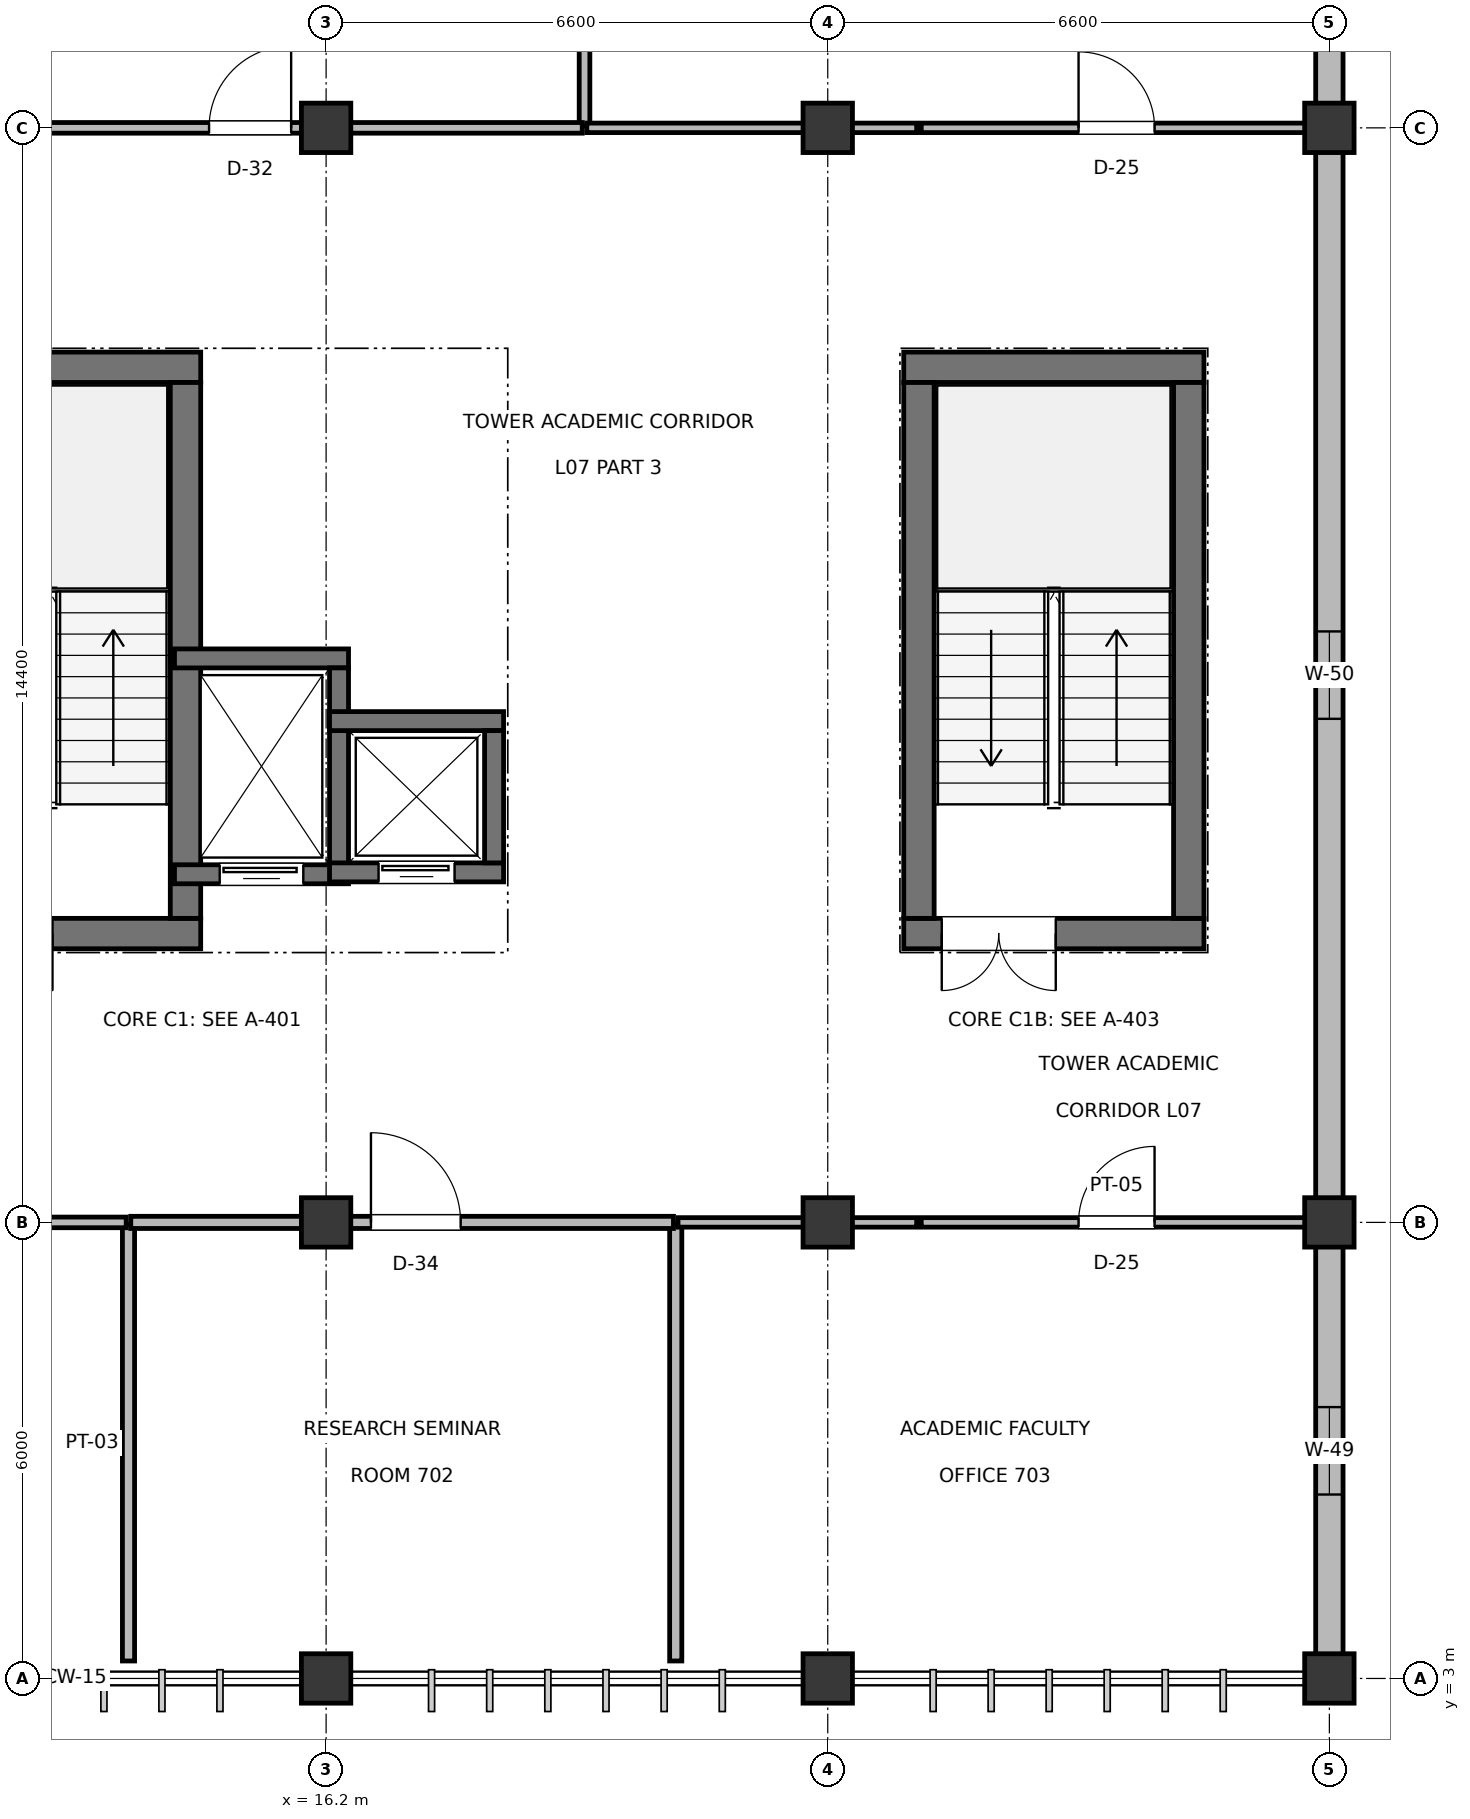
"""IFC4 building model, lengths in metres.
Left out: names, types, materials, properties, quantities, classifications, styles, units other than length and angle.
Written with IfcOpenShell. Run it as: python <this file> out.ifc"""

import sys

from ifc_helpers import new_model, si_unit, direction, frame, frame_2d, origin, origin_2d, place, context, subcontext, project, spatial, rectangle, extrude, element, fill, save


model = new_model("IFC4")
c1 = context("Model", 3, precision=1e-05, world=origin(), true_north=direction((0.0, 1.0)))
c2 = subcontext(c1, "Body", "Model", "MODEL_VIEW")
j1 = project(units=[si_unit("LENGTHUNIT", "METRE"), si_unit("PLANEANGLEUNIT", "RADIAN")], contexts=[c1])
p1 = place(None, origin())
s1 = spatial("IfcSite", under=j1, at=p1, CompositionType="ELEMENT")
p2 = place(p1, origin())
s2 = spatial("IfcBuilding", under=s1, at=p2, CompositionType="ELEMENT")
p3 = place(p2, frame((0.0, 0.0, 33.0)))
s3 = spatial("IfcBuildingStorey", under=s2, at=p3, CompositionType="ELEMENT", Elevation=33.0)
for number, where, z_axis, x_axis in (
    (1, (16.2, 3.0, 0.0), (0.0, 0.0, 1.0), (1.0, 0.0, 0.0)),
    (2, (16.2, 9.0, 0.0), (0.0, 0.0, 1.0), (1.0, 0.0, 0.0)),
    (3, (16.2, 23.4, 0.0), (0.0, 0.0, 1.0), (1.0, 0.0, 0.0)),
    (4, (22.8, 3.0, 0.0), (0.0, 0.0, 1.0), (1.0, 0.0, 0.0)),
    (5, (22.8, 9.0, 0.0), (0.0, 0.0, 1.0), (1.0, 0.0, 0.0)),
    (6, (22.8, 23.4, 0.0), (0.0, 0.0, 1.0), (1.0, 0.0, 0.0)),
    (7, (29.4, 3.0, 0.0), (0.0, 0.0, 1.0), (1.0, 0.0, 0.0)),
    (8, (29.4, 9.0, 0.0), (0.0, 0.0, 1.0), (1.0, 0.0, 0.0)),
    (9, (29.4, 23.4, 0.0), (0.0, 0.0, 1.0), (1.0, 0.0, 0.0)),
):
    element("IfcColumn", number, at=place(p3, frame(where, z_axis=z_axis, x_axis=x_axis)), inside=s3, PredefinedType="COLUMN", context=c2, shape_type="SweptSolid", body=[
        extrude(rectangle(XDim=0.65, YDim=0.65, at=origin_2d()), origin(), (0.0, 0.0, 1.0), 3.8),
    ])
p4 = place(p3, frame((29.4, 3.305, 0.0), z_axis=(0.0, 0.0, 1.0), x_axis=(0.0, 1.0, 0.0)))
e10 = element("IfcWall", 10, at=p4, inside=s3, PredefinedType="SOLIDWALL", context=c2, shape_type="SweptSolid", body=[
    extrude(rectangle(XDim=5.38, YDim=0.36, at=frame_2d((2.69, 0.0))), origin(), (0.0, 0.0, 1.0), 2.925),
])
p5 = place(p4, frame((2.115, 0.0, 0.9)))
e11 = element("IfcOpeningElement", 11, at=p5, cuts=e10, PredefinedType="OPENING", context=c2, shape_type="SweptSolid", body=[
    extrude(rectangle(XDim=1.15, YDim=1.15, at=frame_2d((0.575, 0.575))), frame((0.0, 0.19, 0.0), z_axis=(0.0, -1.0, 0.0), x_axis=(1.0, 0.0, 0.0)), (0.0, 0.0, 1.0), 0.38),
])
p6 = place(p3, frame((29.4, 9.315, 0.0), z_axis=(0.0, 0.0, 1.0), x_axis=(0.0, 1.0, 0.0)))
e12 = element("IfcWall", 12, at=p6, inside=s3, PredefinedType="SOLIDWALL", context=c2, shape_type="SweptSolid", body=[
    extrude(rectangle(XDim=13.77, YDim=0.36, at=frame_2d((6.885, 0.0))), origin(), (0.0, 0.0, 1.0), 2.725),
])
p7 = place(p6, frame((6.31, 0.0, 0.9)))
e13 = element("IfcOpeningElement", 13, at=p7, cuts=e12, PredefinedType="OPENING", context=c2, shape_type="SweptSolid", body=[
    extrude(rectangle(XDim=1.15, YDim=1.35, at=frame_2d((0.575, 0.675))), frame((0.0, 0.19, 0.0), z_axis=(0.0, -1.0, 0.0), x_axis=(1.0, 0.0, 0.0)), (0.0, 0.0, 1.0), 0.38),
])
p8 = place(p3, frame((29.4, 23.705, 0.0), z_axis=(0.0, 0.0, 1.0), x_axis=(0.0, 1.0, 0.0)))
e14 = element("IfcWall", 14, at=p8, inside=s3, PredefinedType="SOLIDWALL", context=c2, shape_type="SweptSolid", body=[
    extrude(rectangle(XDim=5.99, YDim=0.36, at=frame_2d((2.995, 0.0))), origin(), (0.0, 0.0, 1.0), 2.875),
])
p9 = place(p8, frame((2.42, 0.0, 0.9)))
e15 = element("IfcOpeningElement", 15, at=p9, cuts=e14, PredefinedType="OPENING", context=c2, shape_type="SweptSolid", body=[
    extrude(rectangle(XDim=1.15, YDim=1.55, at=frame_2d((0.575, 0.775))), frame((0.0, 0.19, 0.0), z_axis=(0.0, -1.0, 0.0), x_axis=(1.0, 0.0, 0.0)), (0.0, 0.0, 1.0), 0.38),
])
p10 = place(p3, frame((10.6, 12.8, 0.0), z_axis=(0.0, 0.0, 1.0), x_axis=(1.0, 0.0, 0.0)))
e16 = element("IfcWall", 16, at=p10, inside=s3, PredefinedType="SHEAR", context=c2, shape_type="SweptSolid", body=[
    extrude(rectangle(XDim=3.95, YDim=0.4, at=frame_2d((1.975, 0.0))), origin(), (0.0, 0.0, 1.0), 3.58),
])
p11 = place(p10, frame((0.5, 0.0, 0.0)))
e17 = element("IfcOpeningElement", 17, at=p11, cuts=e16, PredefinedType="OPENING", context=c2, shape_type="SweptSolid", body=[
    extrude(rectangle(XDim=1.5, YDim=2.2, at=frame_2d((0.75, 1.1))), frame((0.0, 0.21, 0.0), z_axis=(0.0, -1.0, 0.0), x_axis=(1.0, 0.0, 0.0)), (0.0, 0.0, 1.0), 0.42),
])
p12 = place(p3, frame((10.6, 20.25, 0.0), z_axis=(0.0, 0.0, 1.0), x_axis=(1.0, 0.0, 0.0)))
e18 = element("IfcWall", 18, at=p12, inside=s3, PredefinedType="SHEAR", context=c2, shape_type="SweptSolid", body=[
    extrude(rectangle(XDim=3.95, YDim=0.4, at=frame_2d((1.975, 0.0))), origin(), (0.0, 0.0, 1.0), 3.58),
])
p13 = place(p3, frame((14.35, 13.0, 0.0), z_axis=(0.0, 0.0, 1.0), x_axis=(0.0, 1.0, 0.0)))
e19 = element("IfcWall", 19, at=p13, inside=s3, PredefinedType="SHEAR", context=c2, shape_type="SweptSolid", body=[
    extrude(rectangle(XDim=7.05, YDim=0.4, at=frame_2d((3.525, 0.0))), origin(), (0.0, 0.0, 1.0), 3.58),
])
p14 = place(p3, frame((14.205, 13.58, 0.0), z_axis=(0.0, 0.0, 1.0), x_axis=(1.0, 0.0, 0.0)))
e20 = element("IfcWall", 20, at=p14, inside=s3, PredefinedType="SHEAR", context=c2, shape_type="SweptSolid", body=[
    extrude(rectangle(XDim=2.29, YDim=0.25, at=frame_2d((1.145, 0.0))), origin(), (0.0, 0.0, 1.0), 3.56),
])
p15 = place(p14, frame((0.595, 0.0, 0.0)))
e21 = element("IfcOpeningElement", 21, at=p15, cuts=e20, PredefinedType="OPENING", context=c2, shape_type="SweptSolid", body=[
    extrude(rectangle(XDim=1.1, YDim=2.2, at=frame_2d((0.55, 1.1))), frame((0.0, 0.135, 0.0), z_axis=(0.0, -1.0, 0.0), x_axis=(1.0, 0.0, 0.0)), (0.0, 0.0, 1.0), 0.27),
])
p16 = place(p3, frame((14.205, 16.42, 0.0), z_axis=(0.0, 0.0, 1.0), x_axis=(1.0, 0.0, 0.0)))
e22 = element("IfcWall", 22, at=p16, inside=s3, PredefinedType="SHEAR", context=c2, shape_type="SweptSolid", body=[
    extrude(rectangle(XDim=2.29, YDim=0.25, at=frame_2d((1.145, 0.0))), origin(), (0.0, 0.0, 1.0), 3.56),
])
p17 = place(p3, frame((16.37, 13.705, 0.0), z_axis=(0.0, 0.0, 1.0), x_axis=(0.0, 1.0, 0.0)))
e23 = element("IfcWall", 23, at=p17, inside=s3, PredefinedType="SHEAR", context=c2, shape_type="SweptSolid", body=[
    extrude(rectangle(XDim=2.59, YDim=0.25, at=frame_2d((1.295, 0.0))), origin(), (0.0, 0.0, 1.0), 3.56),
])
p18 = place(p3, frame((16.245, 13.605, 0.0), z_axis=(0.0, 0.0, 1.0), x_axis=(1.0, 0.0, 0.0)))
e24 = element("IfcWall", 24, at=p18, inside=s3, PredefinedType="SHEAR", context=c2, shape_type="SweptSolid", body=[
    extrude(rectangle(XDim=2.29, YDim=0.25, at=frame_2d((1.145, 0.0))), origin(), (0.0, 0.0, 1.0), 3.56),
])
p19 = place(p18, frame((0.645, 0.0, 0.0)))
e25 = element("IfcOpeningElement", 25, at=p19, cuts=e24, PredefinedType="OPENING", context=c2, shape_type="SweptSolid", body=[
    extrude(rectangle(XDim=1.0, YDim=2.15, at=frame_2d((0.5, 1.075))), frame((0.0, 0.135, 0.0), z_axis=(0.0, -1.0, 0.0), x_axis=(1.0, 0.0, 0.0)), (0.0, 0.0, 1.0), 0.27),
])
p20 = place(p3, frame((16.245, 15.595, 0.0), z_axis=(0.0, 0.0, 1.0), x_axis=(1.0, 0.0, 0.0)))
e26 = element("IfcWall", 26, at=p20, inside=s3, PredefinedType="SHEAR", context=c2, shape_type="SweptSolid", body=[
    extrude(rectangle(XDim=2.29, YDim=0.25, at=frame_2d((1.145, 0.0))), origin(), (0.0, 0.0, 1.0), 3.56),
])
p21 = place(p3, frame((18.41, 13.73, 0.0), z_axis=(0.0, 0.0, 1.0), x_axis=(0.0, 1.0, 0.0)))
e27 = element("IfcWall", 27, at=p21, inside=s3, PredefinedType="SHEAR", context=c2, shape_type="SweptSolid", body=[
    extrude(rectangle(XDim=1.74, YDim=0.25, at=frame_2d((0.87, 0.0))), origin(), (0.0, 0.0, 1.0), 3.56),
])
p22 = place(p3, frame((23.8, 12.8, 0.0), z_axis=(0.0, 0.0, 1.0), x_axis=(1.0, 0.0, 0.0)))
e28 = element("IfcWall", 28, at=p22, inside=s3, PredefinedType="SHEAR", context=c2, shape_type="SweptSolid", body=[
    extrude(rectangle(XDim=3.95, YDim=0.4, at=frame_2d((1.975, 0.0))), origin(), (0.0, 0.0, 1.0), 3.58),
])
p23 = place(p22, frame((0.5, 0.0, 0.0)))
e29 = element("IfcOpeningElement", 29, at=p23, cuts=e28, PredefinedType="OPENING", context=c2, shape_type="SweptSolid", body=[
    extrude(rectangle(XDim=1.5, YDim=2.2, at=frame_2d((0.75, 1.1))), frame((0.0, 0.21, 0.0), z_axis=(0.0, -1.0, 0.0), x_axis=(1.0, 0.0, 0.0)), (0.0, 0.0, 1.0), 0.42),
])
p24 = place(p3, frame((23.8, 20.25, 0.0), z_axis=(0.0, 0.0, 1.0), x_axis=(1.0, 0.0, 0.0)))
e30 = element("IfcWall", 30, at=p24, inside=s3, PredefinedType="SHEAR", context=c2, shape_type="SweptSolid", body=[
    extrude(rectangle(XDim=3.95, YDim=0.4, at=frame_2d((1.975, 0.0))), origin(), (0.0, 0.0, 1.0), 3.58),
])
for number, where, z_axis, x_axis in (
    (31, (24.0, 13.0, 0.0), (0.0, 0.0, 1.0), (0.0, 1.0, 0.0)),
    (32, (27.55, 13.0, 0.0), (0.0, 0.0, 1.0), (0.0, 1.0, 0.0)),
):
    element("IfcWall", number, at=place(p3, frame(where, z_axis=z_axis, x_axis=x_axis)), inside=s3, PredefinedType="SHEAR", context=c2, shape_type="SweptSolid", body=[
        extrude(rectangle(XDim=7.05, YDim=0.4, at=frame_2d((3.525, 0.0))), origin(), (0.0, 0.0, 1.0), 3.58),
    ])
p25 = place(p3, frame((13.6, 3.23, 0.0), z_axis=(0.0, 0.0, 1.0), x_axis=(0.0, 1.0, 0.0)))
e33 = element("IfcWall", 33, at=p25, inside=s3, PredefinedType="PARTITIONING", context=c2, shape_type="SweptSolid", body=[
    extrude(rectangle(XDim=5.74, YDim=0.16, at=frame_2d((2.87, 0.0))), origin(), (0.0, 0.0, 1.0), 2.825),
])
p26 = place(p3, frame((10.83, 9.0, 0.0), z_axis=(0.0, 0.0, 1.0), x_axis=(1.0, 0.0, 0.0)))
e34 = element("IfcWall", 34, at=p26, inside=s3, PredefinedType="PARTITIONING", context=c2, shape_type="SweptSolid", body=[
    extrude(rectangle(XDim=2.74, YDim=0.14, at=frame_2d((1.37, 0.0))), origin(), (0.0, 0.0, 1.0), 2.825),
])
p27 = place(p3, frame((20.8, 3.23, 0.0), z_axis=(0.0, 0.0, 1.0), x_axis=(0.0, 1.0, 0.0)))
e35 = element("IfcWall", 35, at=p27, inside=s3, PredefinedType="PARTITIONING", context=c2, shape_type="SweptSolid", body=[
    extrude(rectangle(XDim=5.74, YDim=0.16, at=frame_2d((2.87, 0.0))), origin(), (0.0, 0.0, 1.0), 2.755),
])
p28 = place(p3, frame((13.63, 9.0, 0.0), z_axis=(0.0, 0.0, 1.0), x_axis=(1.0, 0.0, 0.0)))
e36 = element("IfcWall", 36, at=p28, inside=s3, PredefinedType="PARTITIONING", context=c2, shape_type="SweptSolid", body=[
    extrude(rectangle(XDim=7.14, YDim=0.16, at=frame_2d((3.57, 0.0))), origin(), (0.0, 0.0, 1.0), 2.755),
])
p29 = place(p28, frame((3.16, 0.0, 0.0)))
e37 = element("IfcOpeningElement", 37, at=p29, cuts=e36, PredefinedType="OPENING", context=c2, shape_type="SweptSolid", body=[
    extrude(rectangle(XDim=1.18, YDim=2.2, at=frame_2d((0.59, 1.1))), frame((0.0, 0.09, 0.0), z_axis=(0.0, -1.0, 0.0), x_axis=(1.0, 0.0, 0.0)), (0.0, 0.0, 1.0), 0.18),
])
p30 = place(p3, frame((24.03, 9.0, 0.0), z_axis=(0.0, 0.0, 1.0), x_axis=(1.0, 0.0, 0.0)))
e38 = element("IfcWall", 38, at=p30, inside=s3, PredefinedType="PARTITIONING", context=c2, shape_type="SweptSolid", body=[
    extrude(rectangle(XDim=5.14, YDim=0.125, at=frame_2d((2.57, 0.0))), origin(), (0.0, 0.0, 1.0), 2.825),
])
p31 = place(p30, frame((2.07, 0.0, 0.0)))
e39 = element("IfcOpeningElement", 39, at=p31, cuts=e38, PredefinedType="OPENING", context=c2, shape_type="SweptSolid", body=[
    extrude(rectangle(XDim=1.0, YDim=2.15, at=frame_2d((0.5, 1.075))), frame((0.0, 0.073, 0.0), z_axis=(0.0, -1.0, 0.0), x_axis=(1.0, 0.0, 0.0)), (0.0, 0.0, 1.0), 0.145),
])
p32 = place(p3, frame((20.83, 9.0, 0.0), z_axis=(0.0, 0.0, 1.0), x_axis=(1.0, 0.0, 0.0)))
e40 = element("IfcWall", 40, at=p32, inside=s3, PredefinedType="PARTITIONING", context=c2, shape_type="SweptSolid", body=[
    extrude(rectangle(XDim=3.14, YDim=0.125, at=frame_2d((1.57, 0.0))), origin(), (0.0, 0.0, 1.0), 2.755),
])
p33 = place(p3, frame((19.6, 23.43, 0.0), z_axis=(0.0, 0.0, 1.0), x_axis=(0.0, 1.0, 0.0)))
e41 = element("IfcWall", 41, at=p33, inside=s3, PredefinedType="PARTITIONING", context=c2, shape_type="SweptSolid", body=[
    extrude(rectangle(XDim=6.34, YDim=0.14, at=frame_2d((3.17, 0.0))), origin(), (0.0, 0.0, 1.0), 2.645),
])
p34 = place(p3, frame((10.83, 23.4, 0.0), z_axis=(0.0, 0.0, 1.0), x_axis=(1.0, 0.0, 0.0)))
e42 = element("IfcWall", 42, at=p34, inside=s3, PredefinedType="PARTITIONING", context=c2, shape_type="SweptSolid", body=[
    extrude(rectangle(XDim=8.74, YDim=0.14, at=frame_2d((4.37, 0.0))), origin(), (0.0, 0.0, 1.0), 2.645),
])
p35 = place(p34, frame((3.83, 0.0, 0.0)))
e43 = element("IfcOpeningElement", 43, at=p35, cuts=e42, PredefinedType="OPENING", context=c2, shape_type="SweptSolid", body=[
    extrude(rectangle(XDim=1.08, YDim=2.15, at=frame_2d((0.54, 1.075))), frame((0.0, 0.08, 0.0), z_axis=(0.0, -1.0, 0.0), x_axis=(1.0, 0.0, 0.0)), (0.0, 0.0, 1.0), 0.16),
])
p36 = place(p3, frame((24.03, 23.4, 0.0), z_axis=(0.0, 0.0, 1.0), x_axis=(1.0, 0.0, 0.0)))
e44 = element("IfcWall", 44, at=p36, inside=s3, PredefinedType="PARTITIONING", context=c2, shape_type="SweptSolid", body=[
    extrude(rectangle(XDim=5.14, YDim=0.125, at=frame_2d((2.57, 0.0))), origin(), (0.0, 0.0, 1.0), 2.775),
])
p37 = place(p36, frame((2.07, 0.0, 0.0)))
e45 = element("IfcOpeningElement", 45, at=p37, cuts=e44, PredefinedType="OPENING", context=c2, shape_type="SweptSolid", body=[
    extrude(rectangle(XDim=1.0, YDim=2.15, at=frame_2d((0.5, 1.075))), frame((0.0, 0.073, 0.0), z_axis=(0.0, -1.0, 0.0), x_axis=(1.0, 0.0, 0.0)), (0.0, 0.0, 1.0), 0.145),
])
p38 = place(p3, frame((19.63, 23.4, 0.0), z_axis=(0.0, 0.0, 1.0), x_axis=(1.0, 0.0, 0.0)))
e46 = element("IfcWall", 46, at=p38, inside=s3, PredefinedType="PARTITIONING", context=c2, shape_type="SweptSolid", body=[
    extrude(rectangle(XDim=4.34, YDim=0.125, at=frame_2d((2.17, 0.0))), origin(), (0.0, 0.0, 1.0), 2.645),
])
p39 = place(p5, frame((1.15, 0.0, 0.0), z_axis=(0.0, 0.0, 1.0), x_axis=(-1.0, 0.0, 0.0)))
e47 = element("IfcWindow", 47, at=p39, inside=s3, PartitioningType="DOUBLE_PANEL_VERTICAL", PredefinedType="WINDOW", context=c2, shape_type="SweptSolid", body=[
    extrude(rectangle(XDim=1.15, YDim=1.15, at=frame_2d((0.575, 0.575))), frame((0.0, 0.03, 0.0), z_axis=(0.0, -1.0, 0.0), x_axis=(1.0, 0.0, 0.0)), (0.0, 0.0, 1.0), 0.06),
])
fill(e11, e47)
p40 = place(p7, frame((1.15, 0.0, 0.0), z_axis=(0.0, 0.0, 1.0), x_axis=(-1.0, 0.0, 0.0)))
e48 = element("IfcWindow", 48, at=p40, inside=s3, PartitioningType="DOUBLE_PANEL_VERTICAL", PredefinedType="WINDOW", context=c2, shape_type="SweptSolid", body=[
    extrude(rectangle(XDim=1.15, YDim=1.35, at=frame_2d((0.575, 0.675))), frame((0.0, 0.03, 0.0), z_axis=(0.0, -1.0, 0.0), x_axis=(1.0, 0.0, 0.0)), (0.0, 0.0, 1.0), 0.06),
])
fill(e13, e48)
p41 = place(p15, frame((1.1, 0.0, 0.0), z_axis=(0.0, 0.0, 1.0), x_axis=(-1.0, 0.0, 0.0)))
e49 = element("IfcDoor", 49, at=p41, inside=s3, OperationType="SLIDING_TO_LEFT", PredefinedType="DOOR", context=c2, shape_type="SweptSolid", body=[
    extrude(rectangle(XDim=1.1, YDim=2.2, at=frame_2d((0.55, 1.1))), frame((0.0, 0.025, 0.0), z_axis=(0.0, -1.0, 0.0), x_axis=(1.0, 0.0, 0.0)), (0.0, 0.0, 1.0), 0.05),
])
fill(e21, e49)
p42 = place(p19, frame((1.0, 0.0, 0.0), z_axis=(0.0, 0.0, 1.0), x_axis=(-1.0, 0.0, 0.0)))
e50 = element("IfcDoor", 50, at=p42, inside=s3, OperationType="SLIDING_TO_LEFT", PredefinedType="DOOR", context=c2, shape_type="SweptSolid", body=[
    extrude(rectangle(XDim=1.0, YDim=2.15, at=frame_2d((0.5, 1.075))), frame((0.0, 0.025, 0.0), z_axis=(0.0, -1.0, 0.0), x_axis=(1.0, 0.0, 0.0)), (0.0, 0.0, 1.0), 0.05),
])
fill(e25, e50)
p43 = place(p23, frame((1.5, 0.0, 0.0), z_axis=(0.0, 0.0, 1.0), x_axis=(-1.0, 0.0, 0.0)))
e51 = element("IfcDoor", 51, at=p43, inside=s3, OperationType="DOUBLE_DOOR_SINGLE_SWING", PredefinedType="DOOR", context=c2, shape_type="SweptSolid", body=[
    extrude(rectangle(XDim=1.5, YDim=2.2, at=frame_2d((0.75, 1.1))), frame((0.0, 0.025, 0.0), z_axis=(0.0, -1.0, 0.0), x_axis=(1.0, 0.0, 0.0)), (0.0, 0.0, 1.0), 0.05),
])
fill(e29, e51)
p44 = place(p29, origin())
e52 = element("IfcDoor", 52, at=p44, inside=s3, OperationType="SINGLE_SWING_LEFT", PredefinedType="DOOR", context=c2, shape_type="SweptSolid", body=[
    extrude(rectangle(XDim=1.18, YDim=2.2, at=frame_2d((0.59, 1.1))), frame((0.0, 0.025, 0.0), z_axis=(0.0, -1.0, 0.0), x_axis=(1.0, 0.0, 0.0)), (0.0, 0.0, 1.0), 0.05),
])
fill(e37, e52)
p45 = place(p31, origin())
e53 = element("IfcDoor", 53, at=p45, inside=s3, OperationType="SINGLE_SWING_RIGHT", PredefinedType="DOOR", context=c2, shape_type="SweptSolid", body=[
    extrude(rectangle(XDim=1.0, YDim=2.15, at=frame_2d((0.5, 1.075))), frame((0.0, 0.025, 0.0), z_axis=(0.0, -1.0, 0.0), x_axis=(1.0, 0.0, 0.0)), (0.0, 0.0, 1.0), 0.05),
])
fill(e39, e53)
p46 = place(p35, origin())
e54 = element("IfcDoor", 54, at=p46, inside=s3, OperationType="SINGLE_SWING_RIGHT", PredefinedType="DOOR", context=c2, shape_type="SweptSolid", body=[
    extrude(rectangle(XDim=1.08, YDim=2.15, at=frame_2d((0.54, 1.075))), frame((0.0, 0.025, 0.0), z_axis=(0.0, -1.0, 0.0), x_axis=(1.0, 0.0, 0.0)), (0.0, 0.0, 1.0), 0.05),
])
fill(e43, e54)
p47 = place(p37, origin())
e55 = element("IfcDoor", 55, at=p47, inside=s3, OperationType="SINGLE_SWING_LEFT", PredefinedType="DOOR", context=c2, shape_type="SweptSolid", body=[
    extrude(rectangle(XDim=1.0, YDim=2.15, at=frame_2d((0.5, 1.075))), frame((0.0, 0.025, 0.0), z_axis=(0.0, -1.0, 0.0), x_axis=(1.0, 0.0, 0.0)), (0.0, 0.0, 1.0), 0.05),
])
fill(e45, e55)
save(model, sys.argv[1])
